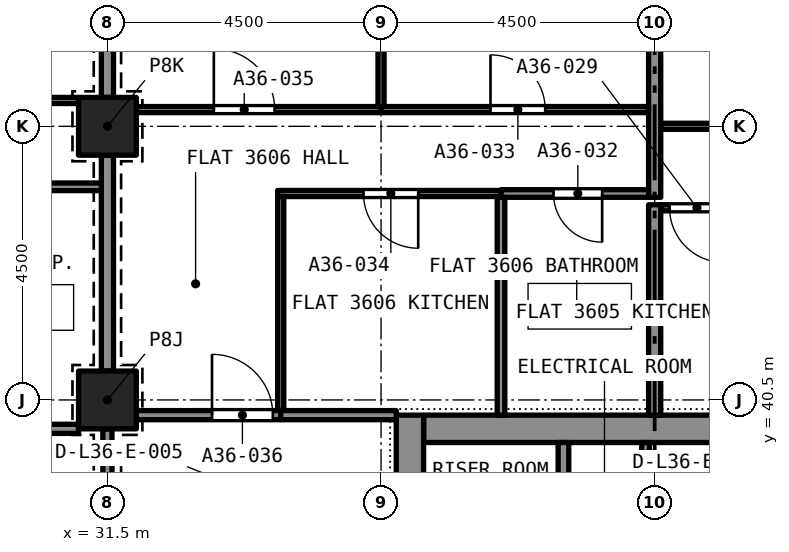
"""IFC4 building model, lengths in metres.
Left out: names, types, materials, properties, quantities, classifications, styles, units other than length and angle.
Written with IfcOpenShell. Run it as: python <this file> out.ifc"""

import sys

from ifc_helpers import new_model, si_unit, direction, frame, frame_2d, origin, origin_2d, place, context, subcontext, project, spatial, rectangle, extrude, element, fill, save


model = new_model("IFC4")
c1 = context("Model", 3, precision=1e-05, world=origin(), true_north=direction((0.0, 1.0)))
c2 = subcontext(c1, "Body", "Model", "MODEL_VIEW")
j1 = project(units=[si_unit("LENGTHUNIT", "METRE"), si_unit("PLANEANGLEUNIT", "RADIAN")], contexts=[c1])
p1 = place(None, origin())
s1 = spatial("IfcSite", under=j1, at=p1, CompositionType="ELEMENT")
p2 = place(p1, origin())
s2 = spatial("IfcBuilding", under=s1, at=p2, CompositionType="ELEMENT")
p3 = place(p2, frame((0.0, 0.0, 130.2)))
s3 = spatial("IfcBuildingStorey", under=s2, at=p3, CompositionType="ELEMENT", Elevation=130.2)
for number, where, z_axis, x_axis in (
    (1, (31.5, 40.5, 0.0), (0.0, 0.0, 1.0), (1.0, 0.0, 0.0)),
    (2, (31.5, 45.0, 0.0), (0.0, 0.0, 1.0), (1.0, 0.0, 0.0)),
):
    element("IfcColumn", number, at=place(p3, frame(where, z_axis=z_axis, x_axis=x_axis)), inside=s3, PredefinedType="COLUMN", context=c2, shape_type="SweptSolid", body=[
        extrude(rectangle(XDim=0.95, YDim=0.95, at=origin_2d()), origin(), (0.0, 0.0, 1.0), 3.2),
    ])
p4 = place(p3, frame((36.7, 40.025, 0.0), z_axis=(0.0, 0.0, 1.0), x_axis=(1.0, 0.0, 0.0)))
e3 = element("IfcWall", 3, at=p4, inside=s3, PredefinedType="SOLIDWALL", context=c2, shape_type="SweptSolid", body=[
    extrude(rectangle(XDim=7.6, YDim=0.45, at=frame_2d((3.8, 0.0))), origin(), (0.0, 0.0, 1.0), 3.2),
])
p5 = place(p3, frame((36.475, 27.25, 0.0), z_axis=(0.0, 0.0, 1.0), x_axis=(0.0, 1.0, 0.0)))
e4 = element("IfcWall", 4, at=p5, inside=s3, PredefinedType="SOLIDWALL", context=c2, shape_type="SweptSolid", body=[
    extrude(rectangle(XDim=13.0, YDim=0.45, at=frame_2d((6.5, 0.0))), origin(), (0.0, 0.0, 1.0), 3.2),
])
p6 = place(p5, frame((8.7, 0.0, 0.0)))
e5 = element("IfcOpeningElement", 5, at=p6, cuts=e4, PredefinedType="OPENING", context=c2, shape_type="SweptSolid", body=[
    extrude(rectangle(XDim=1.2, YDim=2.1, at=frame_2d((0.6, 1.05))), frame((0.0, 0.235, 0.0), z_axis=(0.0, -1.0, 0.0), x_axis=(1.0, 0.0, 0.0)), (0.0, 0.0, 1.0), 0.47),
])
p7 = place(p3, frame((40.6, 45.0, 0.0), z_axis=(0.0, 0.0, 1.0), x_axis=(1.0, 0.0, 0.0)))
e6 = element("IfcWall", 6, at=p7, inside=s3, PredefinedType="PARTITIONING", context=c2, shape_type="SweptSolid", body=[
    extrude(rectangle(XDim=4.4, YDim=0.1, at=frame_2d((2.2, 0.0))), origin(), (0.0, 0.0, 1.0), 2.9),
])
p8 = place(p7, frame((1.7, 0.0, 0.0)))
e7 = element("IfcOpeningElement", 7, at=p8, cuts=e6, PredefinedType="OPENING", context=c2, shape_type="SweptSolid", body=[
    extrude(rectangle(XDim=0.9, YDim=2.1, at=frame_2d((0.45, 1.05))), frame((0.0, 0.06, 0.0), z_axis=(0.0, -1.0, 0.0), x_axis=(1.0, 0.0, 0.0)), (0.0, 0.0, 1.0), 0.12),
])
p9 = place(p3, frame((41.891, 43.66, 0.0), z_axis=(0.0, 0.0, 1.0), x_axis=(-1.0, 0.0, 0.0)))
e8 = element("IfcWall", 8, at=p9, inside=s3, PredefinedType="PARTITIONING", context=c2, shape_type="SweptSolid", body=[
    extrude(rectangle(XDim=1.291, YDim=0.1, at=frame_2d((0.646, 0.0))), origin(), (0.0, 0.0, 1.0), 2.9),
])
p10 = place(p9, frame((0.246, 0.0, 0.0)))
e9 = element("IfcOpeningElement", 9, at=p10, cuts=e8, PredefinedType="OPENING", context=c2, shape_type="SweptSolid", body=[
    extrude(rectangle(XDim=0.9, YDim=2.1, at=frame_2d((0.45, 1.05))), frame((0.0, 0.06, 0.0), z_axis=(0.0, -1.0, 0.0), x_axis=(1.0, 0.0, 0.0)), (0.0, 0.0, 1.0), 0.12),
])
p11 = place(p3, frame((40.5, 43.833, 0.0), z_axis=(0.0, 0.0, 1.0), x_axis=(0.0, 1.0, 0.0)))
e10 = element("IfcWall", 10, at=p11, inside=s3, PredefinedType="PARTITIONING", context=c2, shape_type="SweptSolid", body=[
    extrude(rectangle(XDim=5.192, YDim=0.2, at=frame_2d((2.596, 0.0))), origin(), (0.0, 0.0, 1.0), 2.9),
])
p12 = place(p3, frame((40.5, 40.25, 0.0), z_axis=(0.0, 0.0, 1.0), x_axis=(0.0, 1.0, 0.0)))
e11 = element("IfcWall", 11, at=p12, inside=s3, PredefinedType="PARTITIONING", context=c2, shape_type="SweptSolid", body=[
    extrude(rectangle(XDim=3.46, YDim=0.2, at=frame_2d((1.73, 0.0))), origin(), (0.0, 0.0, 1.0), 2.9),
])
p13 = place(p3, frame((40.4, 43.895, 0.0), z_axis=(0.0, 0.0, 1.0), x_axis=(-1.0, 0.0, 0.0)))
e12 = element("IfcWall", 12, at=p13, inside=s3, PredefinedType="PARTITIONING", context=c2, shape_type="SweptSolid", body=[
    extrude(rectangle(XDim=2.427, YDim=0.125, at=frame_2d((1.214, 0.0))), origin(), (0.0, 0.0, 1.0), 2.9),
])
p14 = place(p13, frame((0.764, 0.0, 0.0)))
e13 = element("IfcOpeningElement", 13, at=p14, cuts=e12, PredefinedType="OPENING", context=c2, shape_type="SweptSolid", body=[
    extrude(rectangle(XDim=0.8, YDim=2.1, at=frame_2d((0.4, 1.05))), frame((0.0, 0.073, 0.0), z_axis=(0.0, -1.0, 0.0), x_axis=(1.0, 0.0, 0.0)), (0.0, 0.0, 1.0), 0.145),
])
p15 = place(p3, frame((37.973, 40.25, 0.0), z_axis=(0.0, 0.0, 1.0), x_axis=(0.0, 1.0, 0.0)))
e14 = element("IfcWall", 14, at=p15, inside=s3, PredefinedType="PARTITIONING", context=c2, shape_type="SweptSolid", body=[
    extrude(rectangle(XDim=3.583, YDim=0.125, at=frame_2d((1.791, 0.0))), origin(), (0.0, 0.0, 1.0), 2.9),
])
p16 = place(p3, frame((36.0, 45.275, 0.0), z_axis=(0.0, 0.0, 1.0), x_axis=(1.0, 0.0, 0.0)))
e15 = element("IfcWall", 15, at=p16, inside=s3, PredefinedType="PARTITIONING", context=c2, shape_type="SweptSolid", body=[
    extrude(rectangle(XDim=4.4, YDim=0.1, at=frame_2d((2.2, 0.0))), origin(), (0.0, 0.0, 1.0), 2.9),
])
p17 = place(p16, frame((1.8, 0.0, 0.0)))
e16 = element("IfcOpeningElement", 16, at=p17, cuts=e15, PredefinedType="OPENING", context=c2, shape_type="SweptSolid", body=[
    extrude(rectangle(XDim=0.9, YDim=2.1, at=frame_2d((0.45, 1.05))), frame((0.0, 0.06, 0.0), z_axis=(0.0, -1.0, 0.0), x_axis=(1.0, 0.0, 0.0)), (0.0, 0.0, 1.0), 0.12),
])
p18 = place(p3, frame((36.0, 45.325, 0.0), z_axis=(0.0, 0.0, 1.0), x_axis=(0.0, 1.0, 0.0)))
e17 = element("IfcWall", 17, at=p18, inside=s3, PredefinedType="PARTITIONING", context=c2, shape_type="SweptSolid", body=[
    extrude(rectangle(XDim=3.7, YDim=0.1, at=frame_2d((1.85, 0.0))), origin(), (0.0, 0.0, 1.0), 2.9),
])
p19 = place(p3, frame((37.973, 43.895, 0.0), z_axis=(0.0, 0.0, 1.0), x_axis=(-1.0, 0.0, 0.0)))
e18 = element("IfcWall", 18, at=p19, inside=s3, PredefinedType="PARTITIONING", context=c2, shape_type="SweptSolid", body=[
    extrude(rectangle(XDim=3.673, YDim=0.1, at=frame_2d((1.836, 0.0))), origin(), (0.0, 0.0, 1.0), 2.9),
])
p20 = place(p19, frame((1.361, 0.0, 0.0)))
e19 = element("IfcOpeningElement", 19, at=p20, cuts=e18, PredefinedType="OPENING", context=c2, shape_type="SweptSolid", body=[
    extrude(rectangle(XDim=0.9, YDim=2.1, at=frame_2d((0.45, 1.05))), frame((0.0, 0.06, 0.0), z_axis=(0.0, -1.0, 0.0), x_axis=(1.0, 0.0, 0.0)), (0.0, 0.0, 1.0), 0.12),
])
p21 = place(p3, frame((34.35, 40.325, 0.0), z_axis=(0.0, 0.0, 1.0), x_axis=(0.0, 1.0, 0.0)))
e20 = element("IfcWall", 20, at=p21, inside=s3, PredefinedType="PARTITIONING", context=c2, shape_type="SweptSolid", body=[
    extrude(rectangle(XDim=3.52, YDim=0.1, at=frame_2d((1.76, 0.0))), origin(), (0.0, 0.0, 1.0), 2.9),
])
p22 = place(p3, frame((31.975, 45.275, 0.0), z_axis=(0.0, 0.0, 1.0), x_axis=(1.0, 0.0, 0.0)))
e21 = element("IfcWall", 21, at=p22, inside=s3, PredefinedType="PARTITIONING", context=c2, shape_type="SweptSolid", body=[
    extrude(rectangle(XDim=4.025, YDim=0.1, at=frame_2d((2.012, 0.0))), origin(), (0.0, 0.0, 1.0), 2.9),
])
p23 = place(p22, frame((1.275, 0.0, 0.0)))
e22 = element("IfcOpeningElement", 22, at=p23, cuts=e21, PredefinedType="OPENING", context=c2, shape_type="SweptSolid", body=[
    extrude(rectangle(XDim=1.0, YDim=2.1, at=frame_2d((0.5, 1.05))), frame((0.0, 0.06, 0.0), z_axis=(0.0, -1.0, 0.0), x_axis=(1.0, 0.0, 0.0)), (0.0, 0.0, 1.0), 0.12),
])
p24 = place(p3, frame((31.5, 40.975, 0.0), z_axis=(0.0, 0.0, 1.0), x_axis=(0.0, 1.0, 0.0)))
e23 = element("IfcWall", 23, at=p24, inside=s3, PredefinedType="PARTITIONING", context=c2, shape_type="SweptSolid", body=[
    extrude(rectangle(XDim=3.55, YDim=0.2, at=frame_2d((1.775, 0.0))), origin(), (0.0, 0.0, 1.0), 2.38),
])
p25 = place(p3, frame((31.975, 40.25, 0.0), z_axis=(0.0, 0.0, 1.0), x_axis=(1.0, 0.0, 0.0)))
e24 = element("IfcWall", 24, at=p25, inside=s3, PredefinedType="PARTITIONING", context=c2, shape_type="SweptSolid", body=[
    extrude(rectangle(XDim=2.375, YDim=0.15, at=frame_2d((1.188, 0.0))), origin(), (0.0, 0.0, 1.0), 2.9),
])
p26 = place(p25, frame((1.245, 0.0, 0.0)))
e25 = element("IfcOpeningElement", 25, at=p26, cuts=e24, PredefinedType="OPENING", context=c2, shape_type="SweptSolid", body=[
    extrude(rectangle(XDim=1.0, YDim=2.1, at=frame_2d((0.5, 1.05))), frame((0.0, 0.085, 0.0), z_axis=(0.0, -1.0, 0.0), x_axis=(1.0, 0.0, 0.0)), (0.0, 0.0, 1.0), 0.17),
])
p27 = place(p3, frame((34.35, 40.25, 0.0), z_axis=(0.0, 0.0, 1.0), x_axis=(1.0, 0.0, 0.0)))
e26 = element("IfcWall", 26, at=p27, inside=s3, PredefinedType="PARTITIONING", context=c2, shape_type="SweptSolid", body=[
    extrude(rectangle(XDim=1.9, YDim=0.15, at=frame_2d((0.95, 0.0))), origin(), (0.0, 0.0, 1.0), 2.9),
])
p28 = place(p3, frame((31.5, 45.475, 0.0), z_axis=(0.0, 0.0, 1.0), x_axis=(0.0, 1.0, 0.0)))
e27 = element("IfcWall", 27, at=p28, inside=s3, PredefinedType="PARTITIONING", context=c2, shape_type="SweptSolid", body=[
    extrude(rectangle(XDim=3.55, YDim=0.2, at=frame_2d((1.775, 0.0))), origin(), (0.0, 0.0, 1.0), 2.38),
])
p29 = place(p3, frame((31.4, 44.005, 0.0), z_axis=(0.0, 0.0, 1.0), x_axis=(-1.0, 0.0, 0.0)))
e28 = element("IfcWall", 28, at=p29, inside=s3, PredefinedType="PARTITIONING", context=c2, shape_type="SweptSolid", body=[
    extrude(rectangle(XDim=2.737, YDim=0.125, at=frame_2d((1.369, 0.0))), origin(), (0.0, 0.0, 1.0), 2.75),
])
p30 = place(p29, frame((0.887, 0.0, 0.0)))
e29 = element("IfcOpeningElement", 29, at=p30, cuts=e28, PredefinedType="OPENING", context=c2, shape_type="SweptSolid", body=[
    extrude(rectangle(XDim=0.8, YDim=2.1, at=frame_2d((0.4, 1.05))), frame((0.0, 0.073, 0.0), z_axis=(0.0, -1.0, 0.0), x_axis=(1.0, 0.0, 0.0)), (0.0, 0.0, 1.0), 0.145),
])
p31 = place(p3, frame((28.725, 40.025, 0.0), z_axis=(0.0, 0.0, 1.0), x_axis=(1.0, 0.0, 0.0)))
e30 = element("IfcWall", 30, at=p31, inside=s3, PredefinedType="PARTITIONING", context=c2, shape_type="SweptSolid", body=[
    extrude(rectangle(XDim=2.3, YDim=0.15, at=frame_2d((1.15, 0.0))), origin(), (0.0, 0.0, 1.0), 2.75),
])
p32 = place(p3, frame((27.0, 45.425, 0.0), z_axis=(0.0, 0.0, 1.0), x_axis=(1.0, 0.0, 0.0)))
e31 = element("IfcWall", 31, at=p32, inside=s3, PredefinedType="PARTITIONING", context=c2, shape_type="SweptSolid", body=[
    extrude(rectangle(XDim=4.025, YDim=0.1, at=frame_2d((2.012, 0.0))), origin(), (0.0, 0.0, 1.0), 2.75),
])
p33 = place(p32, frame((1.8, 0.0, 0.0)))
e32 = element("IfcOpeningElement", 32, at=p33, cuts=e31, PredefinedType="OPENING", context=c2, shape_type="SweptSolid", body=[
    extrude(rectangle(XDim=0.9, YDim=2.1, at=frame_2d((0.45, 1.05))), frame((0.0, 0.06, 0.0), z_axis=(0.0, -1.0, 0.0), x_axis=(1.0, 0.0, 0.0)), (0.0, 0.0, 1.0), 0.12),
])
p34 = place(p3, frame((31.5, 36.475, 0.0), z_axis=(0.0, 0.0, 1.0), x_axis=(0.0, 1.0, 0.0)))
e33 = element("IfcWall", 33, at=p34, inside=s3, PredefinedType="PARTITIONING", context=c2, shape_type="SweptSolid", body=[
    extrude(rectangle(XDim=3.55, YDim=0.15, at=frame_2d((1.775, 0.0))), origin(), (0.0, 0.0, 1.0), 2.38),
])
p35 = place(p34, frame((1.175, 0.0, 0.0)))
e34 = element("IfcOpeningElement", 34, at=p35, cuts=e33, PredefinedType="OPENING", context=c2, shape_type="SweptSolid", body=[
    extrude(rectangle(XDim=1.2, YDim=2.1, at=frame_2d((0.6, 1.05))), frame((0.0, 0.085, 0.0), z_axis=(0.0, -1.0, 0.0), x_axis=(1.0, 0.0, 0.0)), (0.0, 0.0, 1.0), 0.17),
])
p36 = place(p3, frame((39.0, 37.5, 0.0), z_axis=(0.0, 0.0, 1.0), x_axis=(0.0, 1.0, 0.0)))
e35 = element("IfcWall", 35, at=p36, inside=s3, PredefinedType="SOLIDWALL", context=c2, shape_type="SweptSolid", body=[
    extrude(rectangle(XDim=2.3, YDim=0.175, at=frame_2d((1.15, 0.0))), origin(), (0.0, 0.0, 1.0), 2.9),
])
p37 = place(p3, frame((40.35, 37.5, 0.0), z_axis=(0.0, 0.0, 1.0), x_axis=(0.0, 1.0, 0.0)))
e36 = element("IfcWall", 36, at=p37, inside=s3, PredefinedType="PARTITIONING", context=c2, shape_type="SweptSolid", body=[
    extrude(rectangle(XDim=2.3, YDim=0.125, at=frame_2d((1.15, 0.0))), origin(), (0.0, 0.0, 1.0), 2.9),
])
p38 = place(p10, origin())
e37 = element("IfcDoor", 37, at=p38, inside=s3, OperationType="SINGLE_SWING_RIGHT", PredefinedType="DOOR", context=c2, shape_type="SweptSolid", body=[
    extrude(rectangle(XDim=0.9, YDim=2.1, at=frame_2d((0.45, 1.05))), frame((0.0, 0.025, 0.0), z_axis=(0.0, -1.0, 0.0), x_axis=(1.0, 0.0, 0.0)), (0.0, 0.0, 1.0), 0.05),
])
fill(e9, e37)
p39 = place(p14, origin())
e38 = element("IfcDoor", 38, at=p39, inside=s3, OperationType="SINGLE_SWING_LEFT", PredefinedType="DOOR", context=c2, shape_type="SweptSolid", body=[
    extrude(rectangle(XDim=0.8, YDim=2.1, at=frame_2d((0.4, 1.05))), frame((0.0, 0.025, 0.0), z_axis=(0.0, -1.0, 0.0), x_axis=(1.0, 0.0, 0.0)), (0.0, 0.0, 1.0), 0.05),
])
fill(e13, e38)
p40 = place(p17, origin())
e39 = element("IfcDoor", 39, at=p40, inside=s3, OperationType="SINGLE_SWING_RIGHT", PredefinedType="DOOR", context=c2, shape_type="SweptSolid", body=[
    extrude(rectangle(XDim=0.9, YDim=2.1, at=frame_2d((0.45, 1.05))), frame((0.0, 0.025, 0.0), z_axis=(0.0, -1.0, 0.0), x_axis=(1.0, 0.0, 0.0)), (0.0, 0.0, 1.0), 0.05),
])
fill(e16, e39)
p41 = place(p20, origin())
e40 = element("IfcDoor", 40, at=p41, inside=s3, OperationType="SINGLE_SWING_LEFT", PredefinedType="DOOR", context=c2, shape_type="SweptSolid", body=[
    extrude(rectangle(XDim=0.9, YDim=2.1, at=frame_2d((0.45, 1.05))), frame((0.0, 0.025, 0.0), z_axis=(0.0, -1.0, 0.0), x_axis=(1.0, 0.0, 0.0)), (0.0, 0.0, 1.0), 0.05),
])
fill(e19, e40)
p42 = place(p23, origin())
e41 = element("IfcDoor", 41, at=p42, inside=s3, OperationType="SINGLE_SWING_LEFT", PredefinedType="DOOR", context=c2, shape_type="SweptSolid", body=[
    extrude(rectangle(XDim=1.0, YDim=2.1, at=frame_2d((0.5, 1.05))), frame((0.0, 0.025, 0.0), z_axis=(0.0, -1.0, 0.0), x_axis=(1.0, 0.0, 0.0)), (0.0, 0.0, 1.0), 0.05),
])
fill(e22, e41)
p43 = place(p26, origin())
e42 = element("IfcDoor", 42, at=p43, inside=s3, OperationType="SINGLE_SWING_RIGHT", PredefinedType="DOOR", context=c2, shape_type="SweptSolid", body=[
    extrude(rectangle(XDim=1.0, YDim=2.1, at=frame_2d((0.5, 1.05))), frame((0.0, 0.025, 0.0), z_axis=(0.0, -1.0, 0.0), x_axis=(1.0, 0.0, 0.0)), (0.0, 0.0, 1.0), 0.05),
])
fill(e25, e42)
save(model, sys.argv[1])
